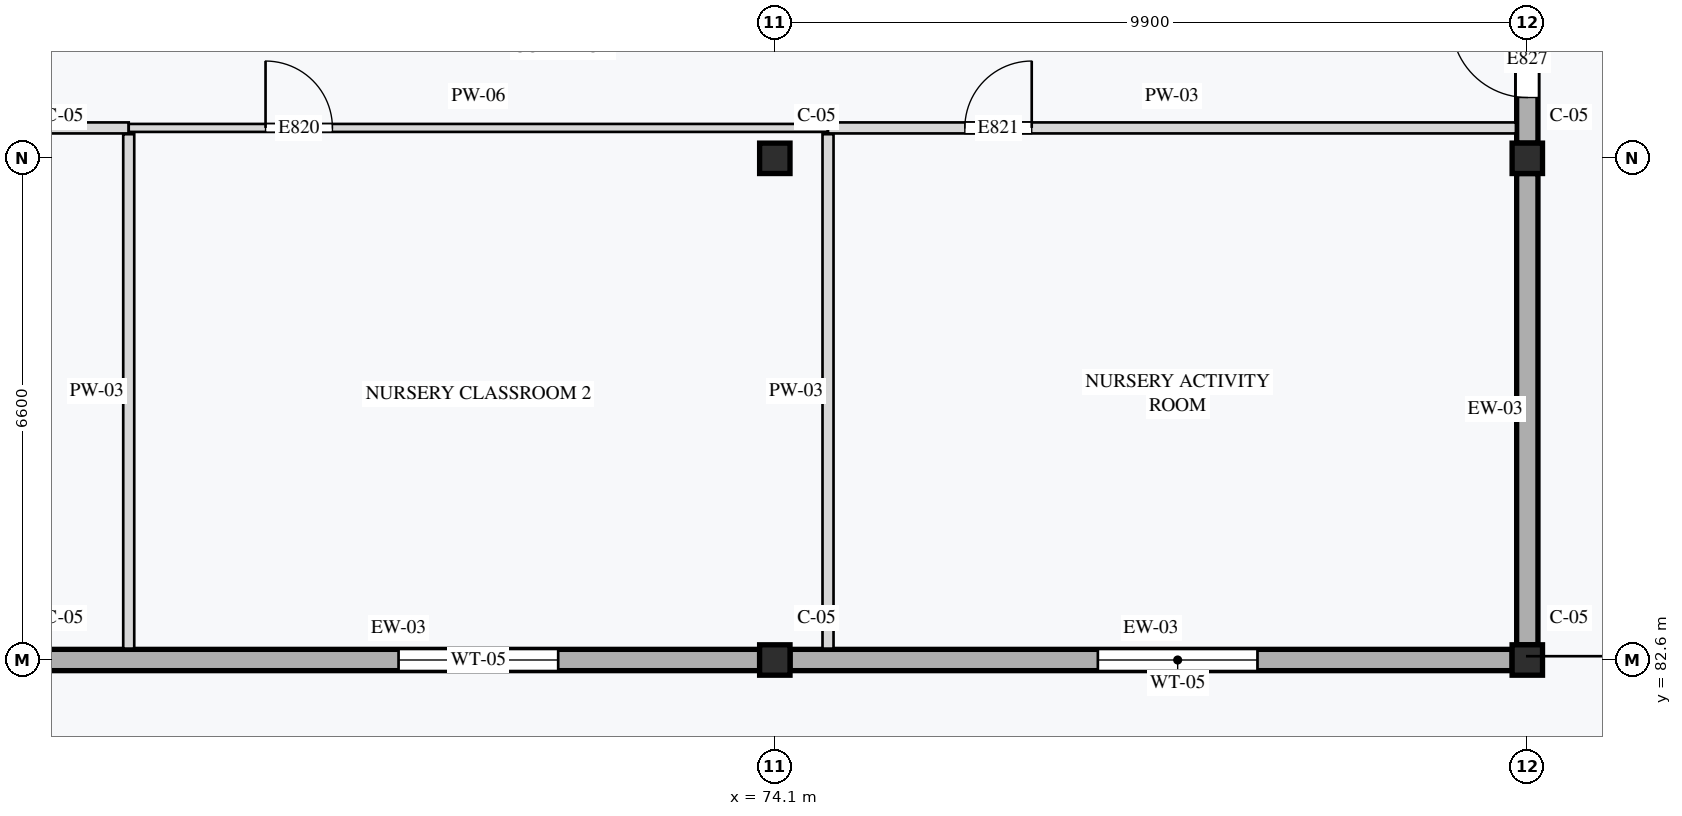
"""IFC4 building model, lengths in metres.
Left out: names, types, materials, properties, quantities, classifications, styles, units other than length and angle.
Written with IfcOpenShell. Run it as: python <this file> out.ifc"""

import sys

from ifc_helpers import new_model, si_unit, direction, frame, frame_2d, origin, origin_2d, place, context, subcontext, project, spatial, rectangle, extrude, element, fill, save


model = new_model("IFC4")
c1 = context("Model", 3, precision=1e-05, world=origin(), true_north=direction((0.0, 1.0)))
c2 = subcontext(c1, "Body", "Model", "MODEL_VIEW")
j1 = project(units=[si_unit("LENGTHUNIT", "METRE"), si_unit("PLANEANGLEUNIT", "RADIAN")], contexts=[c1])
p1 = place(None, origin())
s1 = spatial("IfcSite", under=j1, at=p1, CompositionType="ELEMENT")
p2 = place(p1, origin())
s2 = spatial("IfcBuilding", under=s1, at=p2, CompositionType="ELEMENT")
p3 = place(p2, frame((0.0, 0.0, 4.2)))
s3 = spatial("IfcBuildingStorey", under=s2, at=p3, CompositionType="ELEMENT", Elevation=4.2)
for number, where, z_axis, x_axis in (
    (1, (74.1, 82.6, 0.0), (0.0, 0.0, 1.0), (1.0, 0.0, 0.0)),
    (2, (74.1, 89.2, 0.0), (0.0, 0.0, 1.0), (1.0, 0.0, 0.0)),
    (3, (84.0, 82.6, 0.0), (0.0, 0.0, 1.0), (1.0, 0.0, 0.0)),
    (4, (84.0, 89.2, 0.0), (0.0, 0.0, 1.0), (1.0, 0.0, 0.0)),
):
    element("IfcColumn", number, at=place(p3, frame(where, z_axis=z_axis, x_axis=x_axis)), inside=s3, PredefinedType="COLUMN", context=c2, shape_type="SweptSolid", body=[
        extrude(rectangle(XDim=0.4, YDim=0.4, at=origin_2d()), origin(), (0.0, 0.0, 1.0), 4.2),
    ])
p4 = place(p3, frame((64.4, 82.6, 0.0), z_axis=(0.0, 0.0, 1.0), x_axis=(1.0, 0.0, 0.0)))
e5 = element("IfcWall", 5, at=p4, inside=s3, PredefinedType="STANDARD", context=c2, shape_type="SweptSolid", body=[
    extrude(rectangle(XDim=9.5, YDim=0.28, at=frame_2d((4.75, 0.0))), origin(), (0.0, 0.0, 1.0), 3.45),
])
p5 = place(p4, frame((4.75, 0.0, 0.85)))
e6 = element("IfcOpeningElement", 6, at=p5, cuts=e5, PredefinedType="OPENING", context=c2, shape_type="SweptSolid", body=[
    extrude(rectangle(XDim=2.1, YDim=1.55, at=frame_2d((1.05, 0.775))), frame((0.0, 0.15, 0.0), z_axis=(0.0, -1.0, 0.0), x_axis=(1.0, 0.0, 0.0)), (0.0, 0.0, 1.0), 0.3),
])
p6 = place(p3, frame((74.3, 82.6, 0.0), z_axis=(0.0, 0.0, 1.0), x_axis=(1.0, 0.0, 0.0)))
e7 = element("IfcWall", 7, at=p6, inside=s3, PredefinedType="STANDARD", context=c2, shape_type="SweptSolid", body=[
    extrude(rectangle(XDim=9.5, YDim=0.28, at=frame_2d((4.75, 0.0))), origin(), (0.0, 0.0, 1.0), 3.45),
])
p7 = place(p6, frame((4.05, 0.0, 0.85)))
e8 = element("IfcOpeningElement", 8, at=p7, cuts=e7, PredefinedType="OPENING", context=c2, shape_type="SweptSolid", body=[
    extrude(rectangle(XDim=2.1, YDim=1.55, at=frame_2d((1.05, 0.775))), frame((0.0, 0.15, 0.0), z_axis=(0.0, -1.0, 0.0), x_axis=(1.0, 0.0, 0.0)), (0.0, 0.0, 1.0), 0.3),
])
p8 = place(p3, frame((84.0, 82.8, 0.0), z_axis=(0.0, 0.0, 1.0), x_axis=(0.0, 1.0, 0.0)))
e9 = element("IfcWall", 9, at=p8, inside=s3, PredefinedType="STANDARD", context=c2, shape_type="SweptSolid", body=[
    extrude(rectangle(XDim=6.2, YDim=0.28, at=frame_2d((3.1, 0.0))), origin(), (0.0, 0.0, 1.0), 3.55),
])
p9 = place(p3, frame((84.0, 89.4, 0.0), z_axis=(0.0, 0.0, 1.0), x_axis=(0.0, 1.0, 0.0)))
e10 = element("IfcWall", 10, at=p9, inside=s3, PredefinedType="STANDARD", context=c2, shape_type="SweptSolid", body=[
    extrude(rectangle(XDim=6.2, YDim=0.28, at=frame_2d((3.1, 0.0))), origin(), (0.0, 0.0, 1.0), 3.55),
])
p10 = place(p9, frame((0.6, 0.0, 0.0)))
e11 = element("IfcOpeningElement", 11, at=p10, cuts=e10, PredefinedType="OPENING", context=c2, shape_type="SweptSolid", body=[
    extrude(rectangle(XDim=1.0, YDim=2.15, at=frame_2d((0.5, 1.075))), frame((0.0, 0.15, 0.0), z_axis=(0.0, -1.0, 0.0), x_axis=(1.0, 0.0, 0.0)), (0.0, 0.0, 1.0), 0.3),
])
p11 = place(p3, frame((56.6, 89.6, 0.0), z_axis=(0.0, 0.0, 1.0), x_axis=(1.0, 0.0, 0.0)))
e12 = element("IfcWall", 12, at=p11, inside=s3, PredefinedType="PARTITIONING", context=c2, shape_type="SweptSolid", body=[
    extrude(rectangle(XDim=9.0, YDim=0.145, at=frame_2d((4.5, 0.0))), origin(), (0.0, 0.0, 1.0), 3.94),
])
p12 = place(p11, frame((1.6, 0.0, 0.0)))
e13 = element("IfcOpeningElement", 13, at=p12, cuts=e12, PredefinedType="OPENING", context=c2, shape_type="SweptSolid", body=[
    extrude(rectangle(XDim=0.98, YDim=2.12, at=frame_2d((0.49, 1.06))), frame((0.0, 0.083, 0.0), z_axis=(0.0, -1.0, 0.0), x_axis=(1.0, 0.0, 0.0)), (0.0, 0.0, 1.0), 0.165),
])
p13 = place(p3, frame((65.6, 89.6, 0.0), z_axis=(0.0, 0.0, 1.0), x_axis=(1.0, 0.0, 0.0)))
e14 = element("IfcWall", 14, at=p13, inside=s3, PredefinedType="PARTITIONING", context=c2, shape_type="SweptSolid", body=[
    extrude(rectangle(XDim=9.2, YDim=0.105, at=frame_2d((4.6, 0.0))), origin(), (0.0, 0.0, 1.0), 3.94),
])
p14 = place(p13, frame((1.8, 0.0, 0.0)))
e15 = element("IfcOpeningElement", 15, at=p14, cuts=e14, PredefinedType="OPENING", context=c2, shape_type="SweptSolid", body=[
    extrude(rectangle(XDim=0.88, YDim=2.1, at=frame_2d((0.44, 1.05))), frame((0.0, 0.062, 0.0), z_axis=(0.0, -1.0, 0.0), x_axis=(1.0, 0.0, 0.0)), (0.0, 0.0, 1.0), 0.125),
])
p15 = place(p3, frame((65.6, 82.75, 0.0), z_axis=(0.0, 0.0, 1.0), x_axis=(0.0, 1.0, 0.0)))
e16 = element("IfcWall", 16, at=p15, inside=s3, PredefinedType="PARTITIONING", context=c2, shape_type="SweptSolid", body=[
    extrude(rectangle(XDim=6.768, YDim=0.145, at=frame_2d((3.384, 0.0))), origin(), (0.0, 0.0, 1.0), 3.94),
])
p16 = place(p3, frame((74.8, 89.6, 0.0), z_axis=(0.0, 0.0, 1.0), x_axis=(1.0, 0.0, 0.0)))
e17 = element("IfcWall", 17, at=p16, inside=s3, PredefinedType="PARTITIONING", context=c2, shape_type="SweptSolid", body=[
    extrude(rectangle(XDim=9.05, YDim=0.145, at=frame_2d((4.525, 0.0))), origin(), (0.0, 0.0, 1.0), 3.94),
])
p17 = place(p16, frame((1.8, 0.0, 0.0)))
e18 = element("IfcOpeningElement", 18, at=p17, cuts=e17, PredefinedType="OPENING", context=c2, shape_type="SweptSolid", body=[
    extrude(rectangle(XDim=0.88, YDim=2.16, at=frame_2d((0.44, 1.08))), frame((0.0, 0.083, 0.0), z_axis=(0.0, -1.0, 0.0), x_axis=(1.0, 0.0, 0.0)), (0.0, 0.0, 1.0), 0.165),
])
p18 = place(p3, frame((74.8, 82.75, 0.0), z_axis=(0.0, 0.0, 1.0), x_axis=(0.0, 1.0, 0.0)))
e19 = element("IfcWall", 19, at=p18, inside=s3, PredefinedType="PARTITIONING", context=c2, shape_type="SweptSolid", body=[
    extrude(rectangle(XDim=6.768, YDim=0.145, at=frame_2d((3.384, 0.0))), origin(), (0.0, 0.0, 1.0), 3.94),
])
p19 = place(p5, origin())
e20 = element("IfcWindow", 20, at=p19, inside=s3, PartitioningType="SINGLE_PANEL", PredefinedType="WINDOW", context=c2, shape_type="SweptSolid", body=[
    extrude(rectangle(XDim=2.1, YDim=1.55, at=frame_2d((1.05, 0.775))), frame((0.0, 0.03, 0.0), z_axis=(0.0, -1.0, 0.0), x_axis=(1.0, 0.0, 0.0)), (0.0, 0.0, 1.0), 0.06),
])
fill(e6, e20)
p20 = place(p7, origin())
e21 = element("IfcWindow", 21, at=p20, inside=s3, PartitioningType="SINGLE_PANEL", PredefinedType="WINDOW", context=c2, shape_type="SweptSolid", body=[
    extrude(rectangle(XDim=2.1, YDim=1.55, at=frame_2d((1.05, 0.775))), frame((0.0, 0.03, 0.0), z_axis=(0.0, -1.0, 0.0), x_axis=(1.0, 0.0, 0.0)), (0.0, 0.0, 1.0), 0.06),
])
fill(e8, e21)
p21 = place(p10, origin())
e22 = element("IfcDoor", 22, at=p21, inside=s3, OperationType="SINGLE_SWING_RIGHT", PredefinedType="DOOR", context=c2, shape_type="SweptSolid", body=[
    extrude(rectangle(XDim=1.0, YDim=2.15, at=frame_2d((0.5, 1.075))), frame((0.0, 0.025, 0.0), z_axis=(0.0, -1.0, 0.0), x_axis=(1.0, 0.0, 0.0)), (0.0, 0.0, 1.0), 0.05),
])
fill(e11, e22)
p22 = place(p14, origin())
e23 = element("IfcDoor", 23, at=p22, inside=s3, OperationType="SINGLE_SWING_LEFT", PredefinedType="DOOR", context=c2, shape_type="SweptSolid", body=[
    extrude(rectangle(XDim=0.88, YDim=2.1, at=frame_2d((0.44, 1.05))), frame((0.0, 0.025, 0.0), z_axis=(0.0, -1.0, 0.0), x_axis=(1.0, 0.0, 0.0)), (0.0, 0.0, 1.0), 0.05),
])
fill(e15, e23)
p23 = place(p17, origin())
e24 = element("IfcDoor", 24, at=p23, inside=s3, OperationType="SINGLE_SWING_RIGHT", PredefinedType="DOOR", context=c2, shape_type="SweptSolid", body=[
    extrude(rectangle(XDim=0.88, YDim=2.16, at=frame_2d((0.44, 1.08))), frame((0.0, 0.025, 0.0), z_axis=(0.0, -1.0, 0.0), x_axis=(1.0, 0.0, 0.0)), (0.0, 0.0, 1.0), 0.05),
])
fill(e18, e24)
save(model, sys.argv[1])
